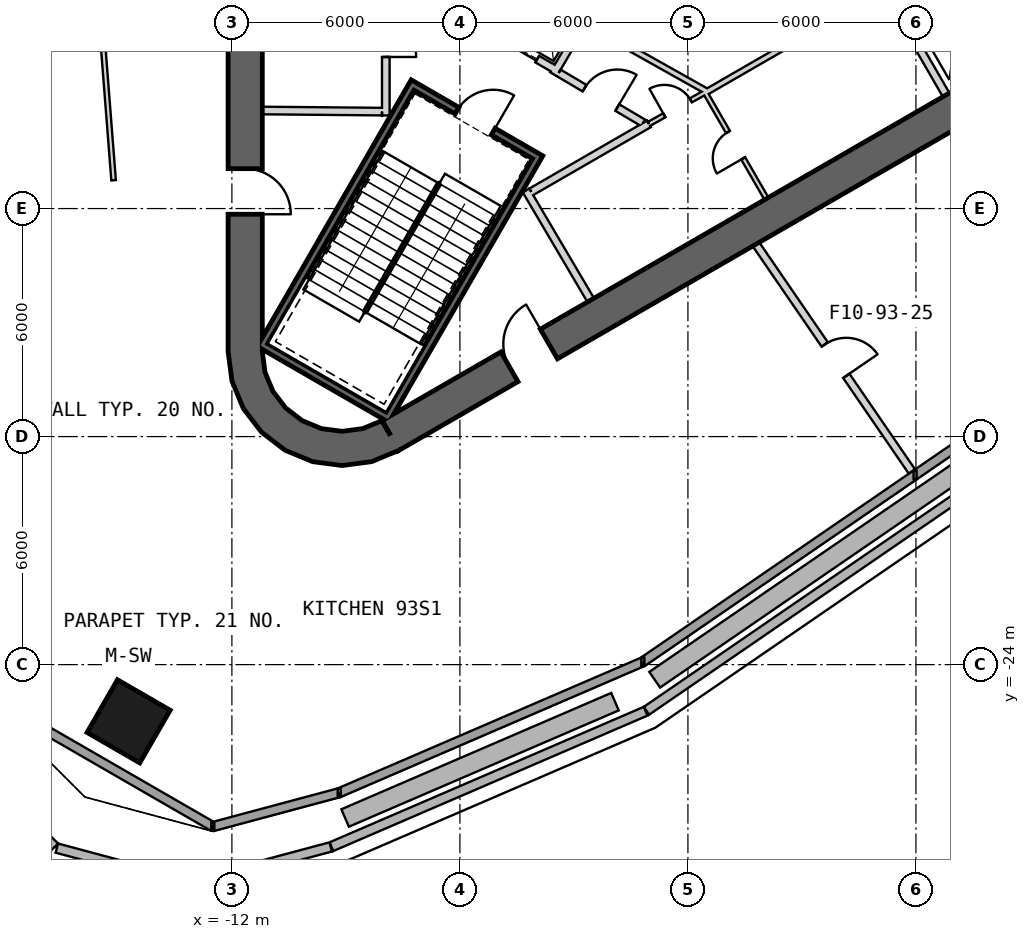
"""IFC4 building model, lengths in metres.
Left out: names, types, materials, properties, quantities, classifications, styles, units other than length and angle.
Written with IfcOpenShell. Run it as: python <this file> out.ifc"""

import sys

from ifc_helpers import new_model, si_unit, direction, frame, frame_2d, origin, origin_2d, place, context, subcontext, project, spatial, polyline, rectangle, outline, extrude, element, fill, save


model = new_model("IFC4")
c1 = context("Model", 3, precision=1e-05, world=origin(), true_north=direction((0.0, 1.0)))
c2 = subcontext(c1, "Body", "Model", "MODEL_VIEW")
j1 = project(units=[si_unit("LENGTHUNIT", "METRE"), si_unit("PLANEANGLEUNIT", "RADIAN")], contexts=[c1])
p1 = place(None, origin())
s1 = spatial("IfcSite", under=j1, at=p1, CompositionType="ELEMENT")
p2 = place(p1, origin())
s2 = spatial("IfcBuilding", under=s1, at=p2, CompositionType="ELEMENT")
p3 = place(p2, frame((0.0, 0.0, 410.3)))
s3 = spatial("IfcBuildingStorey", under=s2, at=p3, CompositionType="ELEMENT", Elevation=410.3)
p4 = place(p3, frame((-14.718, -25.492, -0.25), z_axis=(0.0, 0.0, 1.0), x_axis=(-0.5, -0.866025403784, 0.0)))
e1 = element("IfcColumn", 1, at=p4, inside=s3, PredefinedType="COLUMN", context=c2, shape_type="SweptSolid", body=[
    extrude(rectangle(XDim=1.6, YDim=1.6, at=origin_2d()), origin(), (0.0, 0.0, 1.0), 5.0),
])
p5 = place(p3, frame((-11.65, 15.762, 0.0), z_axis=(0.0, 0.0, 1.0), x_axis=(0.0, -1.0, 0.0)))
e2 = element("IfcWall", 2, at=p5, inside=s3, PredefinedType="SHEAR", context=c2, shape_type="SweptSolid", body=[
    extrude(rectangle(XDim=31.523, YDim=0.9, at=frame_2d((15.762, 0.0))), origin(), (0.0, 0.0, 1.0), 5.0),
])
p6 = place(p5, frame((3.612, 0.0, 0.0)))
e3 = element("IfcOpeningElement", 3, at=p6, cuts=e2, PredefinedType="OPENING", context=c2, shape_type="SweptSolid", body=[
    extrude(rectangle(XDim=1.2, YDim=2.4, at=frame_2d((0.6, 1.2))), frame((0.0, 0.46, 0.0), z_axis=(0.0, -1.0, 0.0), x_axis=(1.0, 0.0, 0.0)), (0.0, 0.0, 1.0), 0.92),
])
p7 = place(p5, frame((26.712, 0.0, 0.0)))
e4 = element("IfcOpeningElement", 4, at=p7, cuts=e2, PredefinedType="OPENING", context=c2, shape_type="SweptSolid", body=[
    extrude(rectangle(XDim=1.2, YDim=2.4, at=frame_2d((0.6, 1.2))), frame((0.0, 0.46, 0.0), z_axis=(0.0, -1.0, 0.0), x_axis=(1.0, 0.0, 0.0)), (0.0, 0.0, 1.0), 0.92),
])
p8 = place(p3, frame((-7.825, -17.97, 0.0), z_axis=(0.0, 0.0, 1.0), x_axis=(0.866028369851, 0.499994862586, 0.0)))
e5 = element("IfcWall", 5, at=p8, inside=s3, PredefinedType="SHEAR", context=c2, shape_type="SweptSolid", body=[
    extrude(rectangle(XDim=31.523, YDim=0.9, at=frame_2d((15.762, 0.0))), origin(), (0.0, 0.0, 1.0), 5.0),
])
p9 = place(p8, frame((17.862, 0.0, 0.0)))
e6 = element("IfcOpeningElement", 6, at=p9, cuts=e5, PredefinedType="OPENING", context=c2, shape_type="SweptSolid", body=[
    extrude(rectangle(XDim=1.2, YDim=2.4, at=frame_2d((0.6, 1.2))), frame((0.0, 0.46, 0.0), z_axis=(0.0, -1.0, 0.0), x_axis=(1.0, 0.0, 0.0)), (0.0, 0.0, 1.0), 0.92),
])
p10 = place(p8, frame((20.562, 0.0, 0.0)))
e7 = element("IfcOpeningElement", 7, at=p10, cuts=e5, PredefinedType="OPENING", context=c2, shape_type="SweptSolid", body=[
    extrude(rectangle(XDim=1.2, YDim=2.4, at=frame_2d((0.6, 1.2))), frame((0.0, 0.46, 0.0), z_axis=(0.0, -1.0, 0.0), x_axis=(1.0, 0.0, 0.0)), (0.0, 0.0, 1.0), 0.92),
])
p11 = place(p8, frame((26.712, 0.0, 0.0)))
e8 = element("IfcOpeningElement", 8, at=p11, cuts=e5, PredefinedType="OPENING", context=c2, shape_type="SweptSolid", body=[
    extrude(rectangle(XDim=1.2, YDim=2.4, at=frame_2d((0.6, 1.2))), frame((0.0, 0.46, 0.0), z_axis=(0.0, -1.0, 0.0), x_axis=(1.0, 0.0, 0.0)), (0.0, 0.0, 1.0), 0.92),
])
p12 = place(p8, frame((3.612, 0.0, 0.0)))
e9 = element("IfcOpeningElement", 9, at=p12, cuts=e5, PredefinedType="OPENING", context=c2, shape_type="SweptSolid", body=[
    extrude(rectangle(XDim=1.2, YDim=2.4, at=frame_2d((0.6, 1.2))), frame((0.0, 0.46, 0.0), z_axis=(0.0, -1.0, 0.0), x_axis=(1.0, 0.0, 0.0)), (0.0, 0.0, 1.0), 0.92),
])
p13 = place(p3, origin())
e10 = element("IfcWall", 10, at=p13, inside=s3, PredefinedType="SHEAR", context=c2, shape_type="SweptSolid", body=[
    extrude(outline(polyline([(-12.1, -15.762), (-11.998, -16.538), (-11.698, -17.262), (-11.221, -17.883), (-10.6, -18.36), (-9.876, -18.659), (-9.1, -18.762), (-8.323, -18.659), (-7.6, -18.36), (-8.05, -17.58), (-8.556, -17.79), (-9.1, -17.862), (-9.644, -17.79), (-10.15, -17.58), (-10.585, -17.247), (-10.919, -16.812), (-11.128, -16.305), (-11.2, -15.762), (-12.1, -15.762)])), origin(), (0.0, 0.0, 1.0), 5.0),
])
p14 = place(p3, frame((-18.224, -24.958, 0.0), z_axis=(0.0, 0.0, 1.0), x_axis=(0.866008373729, -0.500029495762, 0.0)))
e11 = element("IfcWall", 11, at=p14, inside=s3, PredefinedType="SOLIDWALL", context=c2, shape_type="SweptSolid", body=[
    extrude(rectangle(XDim=6.607, YDim=0.24, at=frame_2d((3.304, 0.0))), origin(), (0.0, 0.0, 1.0), 4.75),
])
p15 = place(p3, frame((-12.502, -28.262, 0.0), z_axis=(0.0, 0.0, 1.0), x_axis=(0.965927167772, 0.258814038569, 0.0)))
e12 = element("IfcWall", 12, at=p15, inside=s3, PredefinedType="SOLIDWALL", context=c2, shape_type="SweptSolid", body=[
    extrude(rectangle(XDim=3.444, YDim=0.24, at=frame_2d((1.722, 0.0))), origin(), (0.0, 0.0, 1.0), 4.75),
])
p16 = place(p3, frame((-9.176, -27.371, 0.0), z_axis=(0.0, 0.0, 1.0), x_axis=(0.918299639306, 0.395886059934, 0.0)))
e13 = element("IfcWall", 13, at=p16, inside=s3, PredefinedType="SOLIDWALL", context=c2, shape_type="SweptSolid", body=[
    extrude(rectangle(XDim=8.7, YDim=0.24, at=frame_2d((4.35, 0.0))), origin(), (0.0, 0.0, 1.0), 4.75),
])
p17 = place(p3, frame((-1.186, -23.926, 0.0), z_axis=(0.0, 0.0, 1.0), x_axis=(0.824480875731, 0.565889817503, 0.0)))
e14 = element("IfcWall", 14, at=p17, inside=s3, PredefinedType="SOLIDWALL", context=c2, shape_type="SweptSolid", body=[
    extrude(rectangle(XDim=26.064, YDim=0.24, at=frame_2d((13.032, 0.0))), origin(), (0.0, 0.0, 1.0), 4.75),
])
p18 = place(p3, frame((21.34, -9.818, 0.04), z_axis=(0.0, 0.0, 1.0), x_axis=(-0.82447788812, -0.565894170319, 0.0)))
e15 = element("IfcWall", 15, at=p18, inside=s3, PredefinedType="PARAPET", context=c2, shape_type="SweptSolid", body=[
    extrude(rectangle(XDim=27.207, YDim=0.25, at=frame_2d((13.603, 0.0))), origin(), (0.0, 0.0, 1.0), 1.2),
])
p19 = place(p3, frame((-1.113, -25.226, 0.04), z_axis=(0.0, 0.0, 1.0), x_axis=(-0.918309982659, -0.39586206657, 0.0)))
e16 = element("IfcWall", 16, at=p19, inside=s3, PredefinedType="PARAPET", context=c2, shape_type="SweptSolid", body=[
    extrude(rectangle(XDim=9.005, YDim=0.25, at=frame_2d((4.502, 0.0))), origin(), (0.0, 0.0, 1.0), 1.2),
])
p20 = place(p3, frame((-9.399, -28.797, 0.04), z_axis=(0.0, 0.0, 1.0), x_axis=(-0.965932394764, -0.258794529976, 0.0)))
e17 = element("IfcWall", 17, at=p20, inside=s3, PredefinedType="PARAPET", context=c2, shape_type="SweptSolid", body=[
    extrude(rectangle(XDim=3.758, YDim=0.25, at=frame_2d((1.879, 0.0))), origin(), (0.0, 0.0, 1.0), 1.2),
])
p21 = place(p3, frame((-13.094, -29.77, 0.04), z_axis=(0.0, 0.0, 1.0), x_axis=(-0.965925575047, 0.258819982749, 0.0)))
e18 = element("IfcWall", 18, at=p21, inside=s3, PredefinedType="PARAPET", context=c2, shape_type="SweptSolid", body=[
    extrude(rectangle(XDim=3.636, YDim=0.25, at=frame_2d((1.818, 0.0))), origin(), (0.0, 0.0, 1.0), 1.2),
])
p22 = place(p3, frame((-16.663, -28.796, 0.04), z_axis=(0.0, 0.0, 1.0), x_axis=(-0.707106781187, 0.707106781187, 0.0)))
e19 = element("IfcWall", 19, at=p22, inside=s3, PredefinedType="PARAPET", context=c2, shape_type="SweptSolid", body=[
    extrude(rectangle(XDim=3.636, YDim=0.25, at=frame_2d((1.818, 0.0))), origin(), (0.0, 0.0, 1.0), 1.2),
])
p23 = place(p3, frame((20.588, -9.667, 0.04), z_axis=(0.0, 0.0, 1.0), x_axis=(-0.824474055668, -0.565899753958, 0.0)))
e20 = element("IfcWall", 20, at=p23, inside=s3, PredefinedType="PARAPET", context=c2, shape_type="SweptSolid", body=[
    extrude(rectangle(XDim=26.031, YDim=0.5, at=frame_2d((13.016, 0.0))), origin(), (0.0, 0.0, 1.0), 0.6),
])
p24 = place(p3, frame((-1.919, -24.975, 0.04), z_axis=(0.0, 0.0, 1.0), x_axis=(-0.918308453361, -0.395865614174, 0.0)))
e21 = element("IfcWall", 21, at=p24, inside=s3, PredefinedType="PARAPET", context=c2, shape_type="SweptSolid", body=[
    extrude(rectangle(XDim=7.732, YDim=0.5, at=frame_2d((3.866, 0.0))), origin(), (0.0, 0.0, 1.0), 0.6),
])
p25 = place(p3, frame((6.795, -9.01, 0.0), z_axis=(0.0, 0.0, 1.0), x_axis=(-0.499984717929, 0.866034226713, 0.0)))
e22 = element("IfcWall", 22, at=p25, inside=s3, PredefinedType="PLUMBINGWALL", context=c2, shape_type="SweptSolid", body=[
    extrude(rectangle(XDim=3.25, YDim=0.2, at=frame_2d((1.625, 0.0))), origin(), (0.0, 0.0, 1.0), 4.75),
])
p26 = place(p3, frame((-3.905, -10.563, -0.25), z_axis=(0.0, 0.0, 1.0), x_axis=(-0.500012932018, -0.866017937352, 0.0)))
e23 = element("IfcWall", 23, at=p26, inside=s3, PredefinedType="SHEAR", context=c2, shape_type="SweptSolid", body=[
    extrude(rectangle(XDim=8.1, YDim=0.2, at=frame_2d((4.05, 0.0))), origin(), (0.0, 0.0, 1.0), 5.0),
])
p27 = place(p3, frame((-11.282, -15.541, -0.25), z_axis=(0.0, 0.0, 1.0), x_axis=(0.866000483506, -0.500043160704, 0.0)))
e24 = element("IfcWall", 24, at=p27, inside=s3, PredefinedType="SHEAR", context=c2, shape_type="SweptSolid", body=[
    extrude(rectangle(XDim=3.8, YDim=0.2, at=frame_2d((1.9, 0.0))), origin(), (0.0, 0.0, 1.0), 5.0),
])
p28 = place(p3, frame((-7.196, -8.663, -0.25), z_axis=(0.0, 0.0, 1.0), x_axis=(-0.499997992926, -0.866026562566, 0.0)))
e25 = element("IfcWall", 25, at=p28, inside=s3, PredefinedType="SHEAR", context=c2, shape_type="SweptSolid", body=[
    extrude(rectangle(XDim=7.9, YDim=0.2, at=frame_2d((3.95, 0.0))), origin(), (0.0, 0.0, 1.0), 5.0),
])
p29 = place(p3, frame((-4.041, -10.599, -0.25), z_axis=(0.0, 0.0, 1.0), x_axis=(-0.866047807691, 0.499961193289, 0.0)))
e26 = element("IfcWall", 26, at=p29, inside=s3, PredefinedType="SHEAR", context=c2, shape_type="SweptSolid", body=[
    extrude(rectangle(XDim=3.6, YDim=0.2, at=frame_2d((1.8, 0.0))), origin(), (0.0, 0.0, 1.0), 5.0),
])
p30 = place(p29, frame((1.25, 0.0, 0.25)))
e27 = element("IfcOpeningElement", 27, at=p30, cuts=e26, PredefinedType="OPENING", context=c2, shape_type="SweptSolid", body=[
    extrude(rectangle(XDim=1.1, YDim=2.1, at=frame_2d((0.55, 1.05))), frame((0.0, 0.11, 0.0), z_axis=(0.0, -1.0, 0.0), x_axis=(1.0, 0.0, 0.0)), (0.0, 0.0, 1.0), 0.22),
])
p31 = place(p3, frame((-3.446, -8.368, 0.0), z_axis=(0.0, 0.0, 1.0), x_axis=(-0.866024647952, 0.500001309137, 0.0)))
e28 = element("IfcWall", 28, at=p31, inside=s3, PredefinedType="PLUMBINGWALL", context=c2, shape_type="SweptSolid", body=[
    extrude(rectangle(XDim=2.4, YDim=0.2, at=frame_2d((1.2, 0.0))), origin(), (0.0, 0.0, 1.0), 4.75),
])
p32 = place(p31, frame((0.6, 0.0, 0.0)))
e29 = element("IfcOpeningElement", 29, at=p32, cuts=e28, PredefinedType="OPENING", context=c2, shape_type="SweptSolid", body=[
    extrude(rectangle(XDim=1.2, YDim=2.4, at=frame_2d((0.6, 1.2))), frame((0.0, 0.11, 0.0), z_axis=(0.0, -1.0, 0.0), x_axis=(1.0, 0.0, 0.0)), (0.0, 0.0, 1.0), 0.22),
])
p33 = place(p3, frame((-2.012, -5.882, 0.0), z_axis=(0.0, 0.0, 1.0), x_axis=(-0.508619639323, -0.860991325447, 0.0)))
e30 = element("IfcWall", 30, at=p33, inside=s3, PredefinedType="PLUMBINGWALL", context=c2, shape_type="SweptSolid", body=[
    extrude(rectangle(XDim=3.0, YDim=0.2, at=frame_2d((1.5, 0.0))), origin(), (0.0, 0.0, 1.0), 4.75),
])
p34 = place(p3, frame((-7.95, -9.55, 0.0), z_axis=(0.0, 0.0, 1.0), x_axis=(0.0, 1.0, 0.0)))
e31 = element("IfcWall", 31, at=p34, inside=s3, PredefinedType="PARTITIONING", context=c2, shape_type="SweptSolid", body=[
    extrude(rectangle(XDim=3.778, YDim=0.2, at=frame_2d((1.889, 0.0))), origin(), (0.0, 0.0, 1.0), 4.75),
])
p35 = place(p34, frame((1.539, 0.0, 0.0)))
e32 = element("IfcOpeningElement", 32, at=p35, cuts=e31, PredefinedType="OPENING", context=c2, shape_type="SweptSolid", body=[
    extrude(rectangle(XDim=0.8, YDim=2.1, at=frame_2d((0.4, 1.05))), frame((0.0, 0.11, 0.0), z_axis=(0.0, -1.0, 0.0), x_axis=(1.0, 0.0, 0.0)), (0.0, 0.0, 1.0), 0.22),
])
p36 = place(p3, frame((-11.2, -9.42, 0.0), z_axis=(0.0, 0.0, 1.0), x_axis=(0.999957467379, -0.009222983926, 0.0)))
e33 = element("IfcWall", 33, at=p36, inside=s3, PredefinedType="PARTITIONING", context=c2, shape_type="SweptSolid", body=[
    extrude(rectangle(XDim=3.15, YDim=0.2, at=frame_2d((1.575, 0.0))), origin(), (0.0, 0.0, 1.0), 4.75),
])
p37 = place(p3, frame((2.067, -11.74, 0.0), z_axis=(0.0, 0.0, 1.0), x_axis=(-0.499984717929, 0.866034226713, 0.0)))
e34 = element("IfcWall", 34, at=p37, inside=s3, PredefinedType="PARTITIONING", context=c2, shape_type="SweptSolid", body=[
    extrude(rectangle(XDim=3.25, YDim=0.12, at=frame_2d((1.625, 0.0))), origin(), (0.0, 0.0, 1.0), 4.75),
])
p38 = place(p37, frame((1.225, 0.0, 0.0)))
e35 = element("IfcOpeningElement", 35, at=p38, cuts=e34, PredefinedType="OPENING", context=c2, shape_type="SweptSolid", body=[
    extrude(rectangle(XDim=0.8, YDim=2.1, at=frame_2d((0.4, 1.05))), frame((0.0, 0.07, 0.0), z_axis=(0.0, -1.0, 0.0), x_axis=(1.0, 0.0, 0.0)), (0.0, 0.0, 1.0), 0.14),
])
p39 = place(p3, frame((-4.26, -11.524, 0.0), z_axis=(0.0, 0.0, 1.0), x_axis=(0.507997497166, -0.861358544901, 0.0)))
e36 = element("IfcWall", 36, at=p39, inside=s3, PredefinedType="PARTITIONING", context=c2, shape_type="SweptSolid", body=[
    extrude(rectangle(XDim=3.35, YDim=0.2, at=frame_2d((1.675, 0.0))), origin(), (0.0, 0.0, 1.0), 4.75),
])
p40 = place(p3, frame((-1.024, -9.771, 0.0), z_axis=(0.0, 0.0, 1.0), x_axis=(-0.866029903013, -0.499992207027, 0.0)))
e37 = element("IfcWall", 37, at=p40, inside=s3, PredefinedType="PARTITIONING", context=c2, shape_type="SweptSolid", body=[
    extrude(rectangle(XDim=3.578, YDim=0.2, at=frame_2d((1.789, 0.0))), origin(), (0.0, 0.0, 1.0), 4.75),
])
p41 = place(p3, frame((0.478, -8.928, 0.0), z_axis=(0.0, 0.0, 1.0), x_axis=(-0.871968924608, -0.489561226527, 0.0)))
e38 = element("IfcWall", 38, at=p41, inside=s3, PredefinedType="PARTITIONING", context=c2, shape_type="SweptSolid", body=[
    extrude(rectangle(XDim=1.722, YDim=0.12, at=frame_2d((0.861, 0.0))), origin(), (0.0, 0.0, 1.0), 4.75),
])
p42 = place(p41, frame((0.461, 0.0, 0.0)))
e39 = element("IfcOpeningElement", 39, at=p42, cuts=e38, PredefinedType="OPENING", context=c2, shape_type="SweptSolid", body=[
    extrude(rectangle(XDim=0.8, YDim=2.1, at=frame_2d((0.4, 1.05))), frame((0.0, 0.07, 0.0), z_axis=(0.0, -1.0, 0.0), x_axis=(1.0, 0.0, 0.0)), (0.0, 0.0, 1.0), 0.14),
])
p43 = place(p3, frame((0.483, -8.936, 0.0), z_axis=(0.0, 0.0, 1.0), x_axis=(0.866028230842, 0.499995103361, 0.0)))
e40 = element("IfcWall", 40, at=p43, inside=s3, PredefinedType="PLUMBINGWALL", context=c2, shape_type="SweptSolid", body=[
    extrude(rectangle(XDim=5.4, YDim=0.15, at=frame_2d((2.7, 0.0))), origin(), (0.0, 0.0, 1.0), 4.75),
])
p44 = place(p3, frame((-3.401, -8.43, 0.0), z_axis=(0.0, 0.0, 1.0), x_axis=(0.860630814782, -0.509229418482, 0.0)))
e41 = element("IfcWall", 41, at=p44, inside=s3, PredefinedType="PARTITIONING", context=c2, shape_type="SweptSolid", body=[
    extrude(rectangle(XDim=2.582, YDim=0.2, at=frame_2d((1.291, 0.0))), origin(), (0.0, 0.0, 1.0), 4.75),
])
p45 = place(p44, frame((0.791, 0.0, 0.0)))
e42 = element("IfcOpeningElement", 42, at=p45, cuts=e41, PredefinedType="OPENING", context=c2, shape_type="SweptSolid", body=[
    extrude(rectangle(XDim=1.0, YDim=2.1, at=frame_2d((0.5, 1.05))), frame((0.0, 0.11, 0.0), z_axis=(0.0, -1.0, 0.0), x_axis=(1.0, 0.0, 0.0)), (0.0, 0.0, 1.0), 0.22),
])
p46 = place(p3, frame((-1.477, -7.808, 0.0), z_axis=(0.0, 0.0, 1.0), x_axis=(0.871822901869, -0.48982122022, 0.0)))
e43 = element("IfcWall", 43, at=p46, inside=s3, PredefinedType="PLUMBINGWALL", context=c2, shape_type="SweptSolid", body=[
    extrude(rectangle(XDim=2.24, YDim=0.15, at=frame_2d((1.12, 0.0))), origin(), (0.0, 0.0, 1.0), 4.75),
])
p47 = place(p3, frame((-15.669, -4.137, 0.0), z_axis=(0.0, 0.0, 1.0), x_axis=(0.077857398884, -0.996964505606, 0.0)))
e44 = element("IfcWall", 44, at=p47, inside=s3, PredefinedType="PARTITIONING", context=c2, shape_type="SweptSolid", body=[
    extrude(rectangle(XDim=7.14, YDim=0.12, at=frame_2d((3.57, 0.0))), origin(), (0.0, 0.0, 1.0), 4.75),
])
p48 = place(p3, frame((1.79, -12.938, 0.0), z_axis=(0.0, 0.0, 1.0), x_axis=(0.565855513997, -0.824504419199, 0.0)))
e45 = element("IfcWall", 45, at=p48, inside=s3, PredefinedType="PARTITIONING", context=c2, shape_type="SweptSolid", body=[
    extrude(rectangle(XDim=7.25, YDim=0.2, at=frame_2d((3.625, 0.0))), origin(), (0.0, 0.0, 1.0), 4.75),
])
p49 = place(p48, frame((3.2, 0.0, 0.0)))
e46 = element("IfcOpeningElement", 46, at=p49, cuts=e45, PredefinedType="OPENING", context=c2, shape_type="SweptSolid", body=[
    extrude(rectangle(XDim=1.0, YDim=2.1, at=frame_2d((0.5, 1.05))), frame((0.0, 0.11, 0.0), z_axis=(0.0, -1.0, 0.0), x_axis=(1.0, 0.0, 0.0)), (0.0, 0.0, 1.0), 0.22),
])
p50 = place(p30, origin())
e47 = element("IfcDoor", 47, at=p50, inside=s3, OperationType="SINGLE_SWING_LEFT", PredefinedType="USERDEFINED", context=c2, shape_type="SweptSolid", body=[
    extrude(rectangle(XDim=1.1, YDim=2.1, at=frame_2d((0.55, 1.05))), frame((0.0, 0.025, 0.0), z_axis=(0.0, -1.0, 0.0), x_axis=(1.0, 0.0, 0.0)), (0.0, 0.0, 1.0), 0.05),
])
fill(e27, e47)
p51 = place(p45, origin())
e48 = element("IfcDoor", 48, at=p51, inside=s3, OperationType="SINGLE_SWING_RIGHT", PredefinedType="USERDEFINED", context=c2, shape_type="SweptSolid", body=[
    extrude(rectangle(XDim=1.0, YDim=2.1, at=frame_2d((0.5, 1.05))), frame((0.0, 0.025, 0.0), z_axis=(0.0, -1.0, 0.0), x_axis=(1.0, 0.0, 0.0)), (0.0, 0.0, 1.0), 0.05),
])
fill(e42, e48)
p52 = place(p32, origin())
e49 = element("IfcDoor", 49, at=p52, inside=s3, OperationType="SLIDING_TO_LEFT", PredefinedType="USERDEFINED", context=c2, shape_type="SweptSolid", body=[
    extrude(rectangle(XDim=1.2, YDim=2.4, at=frame_2d((0.6, 1.2))), frame((0.0, 0.025, 0.0), z_axis=(0.0, -1.0, 0.0), x_axis=(1.0, 0.0, 0.0)), (0.0, 0.0, 1.0), 0.05),
])
fill(e29, e49)
p53 = place(p35, origin())
e50 = element("IfcDoor", 50, at=p53, inside=s3, OperationType="SINGLE_SWING_LEFT", PredefinedType="USERDEFINED", context=c2, shape_type="SweptSolid", body=[
    extrude(rectangle(XDim=0.8, YDim=2.1, at=frame_2d((0.4, 1.05))), frame((0.0, 0.025, 0.0), z_axis=(0.0, -1.0, 0.0), x_axis=(1.0, 0.0, 0.0)), (0.0, 0.0, 1.0), 0.05),
])
fill(e32, e50)
p54 = place(p42, origin())
e51 = element("IfcDoor", 51, at=p54, inside=s3, OperationType="SINGLE_SWING_RIGHT", PredefinedType="USERDEFINED", context=c2, shape_type="SweptSolid", body=[
    extrude(rectangle(XDim=0.8, YDim=2.1, at=frame_2d((0.4, 1.05))), frame((0.0, 0.025, 0.0), z_axis=(0.0, -1.0, 0.0), x_axis=(1.0, 0.0, 0.0)), (0.0, 0.0, 1.0), 0.05),
])
fill(e39, e51)
p55 = place(p38, origin())
e52 = element("IfcDoor", 52, at=p55, inside=s3, OperationType="SINGLE_SWING_LEFT", PredefinedType="USERDEFINED", context=c2, shape_type="SweptSolid", body=[
    extrude(rectangle(XDim=0.8, YDim=2.1, at=frame_2d((0.4, 1.05))), frame((0.0, 0.025, 0.0), z_axis=(0.0, -1.0, 0.0), x_axis=(1.0, 0.0, 0.0)), (0.0, 0.0, 1.0), 0.05),
])
fill(e35, e52)
p56 = place(p49, origin())
e53 = element("IfcDoor", 53, at=p56, inside=s3, OperationType="SINGLE_SWING_RIGHT", PredefinedType="USERDEFINED", context=c2, shape_type="SweptSolid", body=[
    extrude(rectangle(XDim=1.0, YDim=2.1, at=frame_2d((0.5, 1.05))), frame((0.0, 0.025, 0.0), z_axis=(0.0, -1.0, 0.0), x_axis=(1.0, 0.0, 0.0)), (0.0, 0.0, 1.0), 0.05),
])
fill(e46, e53)
p57 = place(p7, origin())
e54 = element("IfcDoor", 54, at=p57, inside=s3, OperationType="SINGLE_SWING_RIGHT", PredefinedType="USERDEFINED", context=c2, shape_type="SweptSolid", body=[
    extrude(rectangle(XDim=1.2, YDim=2.4, at=frame_2d((0.6, 1.2))), frame((0.0, 0.025, 0.0), z_axis=(0.0, -1.0, 0.0), x_axis=(1.0, 0.0, 0.0)), (0.0, 0.0, 1.0), 0.05),
])
fill(e4, e54)
p58 = place(p12, origin())
e55 = element("IfcDoor", 55, at=p58, inside=s3, OperationType="SINGLE_SWING_RIGHT", PredefinedType="USERDEFINED", context=c2, shape_type="SweptSolid", body=[
    extrude(rectangle(XDim=1.2, YDim=2.4, at=frame_2d((0.6, 1.2))), frame((0.0, 0.025, 0.0), z_axis=(0.0, -1.0, 0.0), x_axis=(1.0, 0.0, 0.0)), (0.0, 0.0, 1.0), 0.05),
])
fill(e9, e55)
save(model, sys.argv[1])
